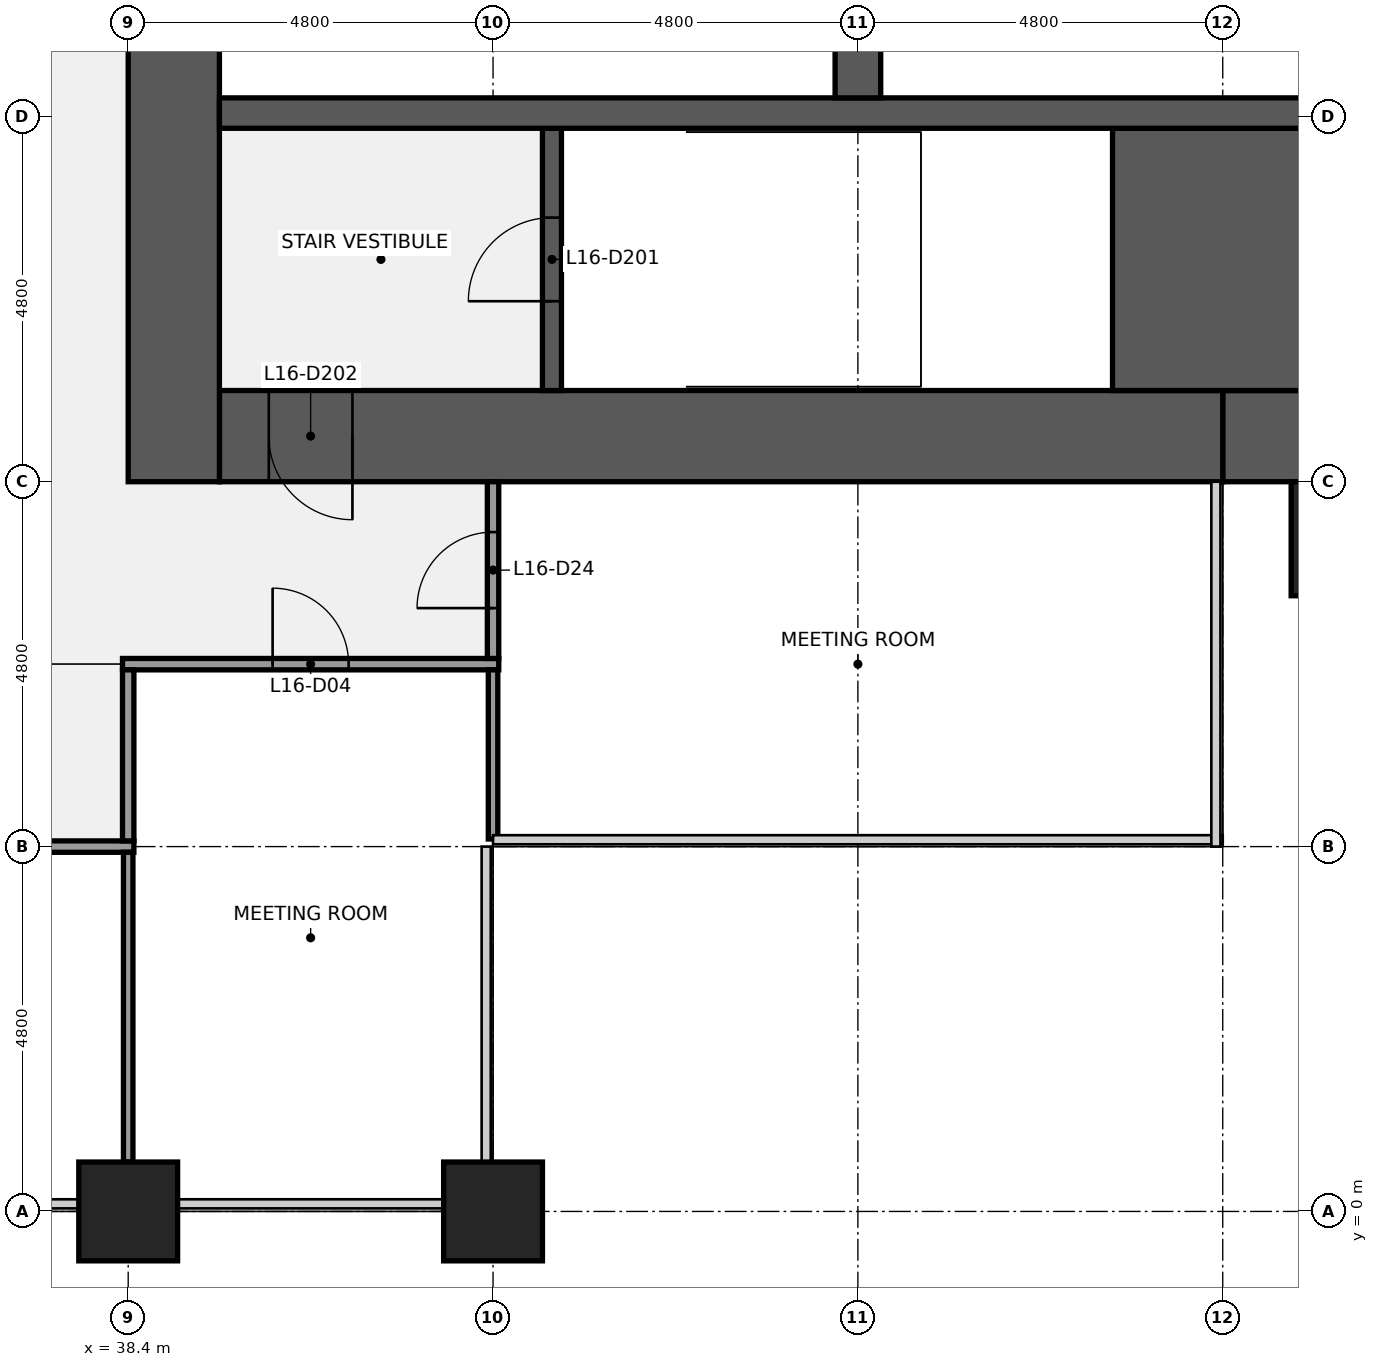
"""IFC4 building model, lengths in metres.
Left out: names, types, materials, properties, quantities, classifications, styles, units other than length and angle.
Written with IfcOpenShell. Run it as: python <this file> out.ifc"""

import sys

from ifc_helpers import new_model, si_unit, direction, frame, frame_2d, origin, origin_2d, place, context, subcontext, project, spatial, rectangle, extrude, element, fill, save


model = new_model("IFC4")
c1 = context("Model", 3, precision=1e-05, world=origin(), true_north=direction((0.0, 1.0)))
c2 = subcontext(c1, "Body", "Model", "MODEL_VIEW")
j1 = project(units=[si_unit("LENGTHUNIT", "METRE"), si_unit("PLANEANGLEUNIT", "RADIAN")], contexts=[c1])
p1 = place(None, origin())
s1 = spatial("IfcSite", under=j1, at=p1, CompositionType="ELEMENT")
p2 = place(p1, origin())
s2 = spatial("IfcBuilding", under=s1, at=p2, CompositionType="ELEMENT")
p3 = place(p2, frame((0.0, 0.0, 75.0)))
s3 = spatial("IfcBuildingStorey", under=s2, at=p3, CompositionType="ELEMENT", Elevation=75.0)
for number, where, z_axis, x_axis in (
    (1, (38.4, 0.0, 0.0), (0.0, 0.0, 1.0), (1.0, 0.0, 0.0)),
    (2, (43.2, 0.0, 0.0), (0.0, 0.0, 1.0), (1.0, 0.0, 0.0)),
):
    element("IfcColumn", number, at=place(p3, frame(where, z_axis=z_axis, x_axis=x_axis)), inside=s3, PredefinedType="COLUMN", context=c2, shape_type="SweptSolid", body=[
        extrude(rectangle(XDim=1.3, YDim=1.3, at=origin_2d()), origin(), (0.0, 0.0, 1.0), 4.0),
    ])
p4 = place(p3, frame((56.4, 10.2, 0.0), z_axis=(0.0, 0.0, 1.0), x_axis=(-1.0, 0.0, 0.0)))
e3 = element("IfcWall", 3, at=p4, inside=s3, PredefinedType="SHEAR", context=c2, shape_type="SweptSolid", body=[
    extrude(rectangle(XDim=3.6, YDim=1.2, at=frame_2d((1.8, 0.0))), origin(), (0.0, 0.0, 1.0), 3.84),
])
p5 = place(p3, frame((52.8, 10.2, 0.0), z_axis=(0.0, 0.0, 1.0), x_axis=(-1.0, 0.0, 0.0)))
e4 = element("IfcWall", 4, at=p5, inside=s3, PredefinedType="SHEAR", context=c2, shape_type="SweptSolid", body=[
    extrude(rectangle(XDim=13.2, YDim=1.2, at=frame_2d((6.6, 0.0))), origin(), (0.0, 0.0, 1.0), 3.84),
])
p6 = place(p5, frame((11.45, 0.0, 0.0)))
e5 = element("IfcOpeningElement", 5, at=p6, cuts=e4, PredefinedType="OPENING", context=c2, shape_type="SweptSolid", body=[
    extrude(rectangle(XDim=1.1, YDim=2.1, at=frame_2d((0.55, 1.05))), frame((0.0, 0.61, 0.0), z_axis=(0.0, -1.0, 0.0), x_axis=(1.0, 0.0, 0.0)), (0.0, 0.0, 1.0), 1.22),
])
p7 = place(p3, frame((39.0, 9.6, 0.0), z_axis=(0.0, 0.0, 1.0), x_axis=(0.0, 1.0, 0.0)))
e6 = element("IfcWall", 6, at=p7, inside=s3, PredefinedType="SHEAR", context=c2, shape_type="SweptSolid", body=[
    extrude(rectangle(XDim=28.8, YDim=1.2, at=frame_2d((14.4, 0.0))), origin(), (0.0, 0.0, 1.0), 3.84),
])
p8 = place(p7, frame((8.7, 0.0, 0.0)))
e7 = element("IfcOpeningElement", 7, at=p8, cuts=e6, PredefinedType="OPENING", context=c2, shape_type="SweptSolid", body=[
    extrude(rectangle(XDim=1.8, YDim=2.1, at=frame_2d((0.9, 1.05))), frame((0.0, 0.61, 0.0), z_axis=(0.0, -1.0, 0.0), x_axis=(1.0, 0.0, 0.0)), (0.0, 0.0, 1.0), 1.22),
])
p9 = place(p7, frame((18.3, 0.0, 0.0)))
e8 = element("IfcOpeningElement", 8, at=p9, cuts=e6, PredefinedType="OPENING", context=c2, shape_type="SweptSolid", body=[
    extrude(rectangle(XDim=1.8, YDim=2.1, at=frame_2d((0.9, 1.05))), frame((0.0, 0.61, 0.0), z_axis=(0.0, -1.0, 0.0), x_axis=(1.0, 0.0, 0.0)), (0.0, 0.0, 1.0), 1.22),
])
p10 = place(p3, frame((51.35, 12.525, 0.0), z_axis=(0.0, 0.0, 1.0), x_axis=(1.0, 0.0, 0.0)))
e9 = element("IfcWall", 9, at=p10, inside=s3, PredefinedType="SHEAR", context=c2, shape_type="SweptSolid", body=[
    extrude(rectangle(XDim=5.05, YDim=3.45, at=frame_2d((2.525, 0.0))), origin(), (0.0, 0.0, 1.0), 3.84),
])
p11 = place(p3, frame((43.975, 10.8, 0.0), z_axis=(0.0, 0.0, 1.0), x_axis=(0.0, 1.0, 0.0)))
e10 = element("IfcWall", 10, at=p11, inside=s3, PredefinedType="SHEAR", context=c2, shape_type="SweptSolid", body=[
    extrude(rectangle(XDim=3.45, YDim=0.25, at=frame_2d((1.725, 0.0))), origin(), (0.0, 0.0, 1.0), 3.84),
])
p12 = place(p11, frame((1.175, 0.0, 0.0)))
e11 = element("IfcOpeningElement", 11, at=p12, cuts=e10, PredefinedType="OPENING", context=c2, shape_type="SweptSolid", body=[
    extrude(rectangle(XDim=1.1, YDim=2.1, at=frame_2d((0.55, 1.05))), frame((0.0, 0.135, 0.0), z_axis=(0.0, -1.0, 0.0), x_axis=(1.0, 0.0, 0.0)), (0.0, 0.0, 1.0), 0.27),
])
p13 = place(p3, frame((39.6, 14.45, 0.0), z_axis=(0.0, 0.0, 1.0), x_axis=(1.0, 0.0, 0.0)))
e12 = element("IfcWall", 12, at=p13, inside=s3, PredefinedType="SHEAR", context=c2, shape_type="SweptSolid", body=[
    extrude(rectangle(XDim=16.8, YDim=0.4, at=frame_2d((8.4, 0.0))), origin(), (0.0, 0.0, 1.0), 3.84),
])
p14 = place(p3, frame((48.0, 14.65, 0.0), z_axis=(0.0, 0.0, 1.0), x_axis=(0.0, 1.0, 0.0)))
e13 = element("IfcWall", 13, at=p14, inside=s3, PredefinedType="SHEAR", context=c2, shape_type="SweptSolid", body=[
    extrude(rectangle(XDim=2.6, YDim=0.6, at=frame_2d((1.3, 0.0))), origin(), (0.0, 0.0, 1.0), 3.84),
])
p15 = place(p3, frame((19.125, 4.8, 0.0), z_axis=(0.0, 0.0, 1.0), x_axis=(1.0, 0.0, 0.0)))
e14 = element("IfcWall", 14, at=p15, inside=s3, PredefinedType="PARTITIONING", context=c2, shape_type="SweptSolid", body=[
    extrude(rectangle(XDim=19.35, YDim=0.15, at=frame_2d((9.675, 0.0))), origin(), (0.0, 0.0, 1.0), 2.87),
])
p16 = place(p15, frame((4.375, 0.0, 0.0)))
e15 = element("IfcOpeningElement", 15, at=p16, cuts=e14, PredefinedType="OPENING", context=c2, shape_type="SweptSolid", body=[
    extrude(rectangle(XDim=1.0, YDim=2.1, at=frame_2d((0.5, 1.05))), frame((0.0, 0.085, 0.0), z_axis=(0.0, -1.0, 0.0), x_axis=(1.0, 0.0, 0.0)), (0.0, 0.0, 1.0), 0.17),
])
p17 = place(p15, frame((13.975, 0.0, 0.0)))
e16 = element("IfcOpeningElement", 16, at=p17, cuts=e14, PredefinedType="OPENING", context=c2, shape_type="SweptSolid", body=[
    extrude(rectangle(XDim=1.0, YDim=2.1, at=frame_2d((0.5, 1.05))), frame((0.0, 0.085, 0.0), z_axis=(0.0, -1.0, 0.0), x_axis=(1.0, 0.0, 0.0)), (0.0, 0.0, 1.0), 0.17),
])
p18 = place(p3, frame((38.325, 7.2, 0.0), z_axis=(0.0, 0.0, 1.0), x_axis=(1.0, 0.0, 0.0)))
e17 = element("IfcWall", 17, at=p18, inside=s3, PredefinedType="PARTITIONING", context=c2, shape_type="SweptSolid", body=[
    extrude(rectangle(XDim=4.95, YDim=0.15, at=frame_2d((2.475, 0.0))), origin(), (0.0, 0.0, 1.0), 2.87),
])
p19 = place(p18, frame((1.975, 0.0, 0.0)))
e18 = element("IfcOpeningElement", 18, at=p19, cuts=e17, PredefinedType="OPENING", context=c2, shape_type="SweptSolid", body=[
    extrude(rectangle(XDim=1.0, YDim=2.1, at=frame_2d((0.5, 1.05))), frame((0.0, 0.085, 0.0), z_axis=(0.0, -1.0, 0.0), x_axis=(1.0, 0.0, 0.0)), (0.0, 0.0, 1.0), 0.17),
])
p20 = place(p3, frame((38.4, 0.65, 0.0), z_axis=(0.0, 0.0, 1.0), x_axis=(0.0, 1.0, 0.0)))
e19 = element("IfcWall", 19, at=p20, inside=s3, PredefinedType="PARTITIONING", context=c2, shape_type="SweptSolid", body=[
    extrude(rectangle(XDim=4.075, YDim=0.125, at=frame_2d((2.038, 0.0))), origin(), (0.0, 0.0, 1.0), 2.87),
])
p21 = place(p3, frame((38.4, 4.875, 0.0), z_axis=(0.0, 0.0, 1.0), x_axis=(0.0, 1.0, 0.0)))
e20 = element("IfcWall", 20, at=p21, inside=s3, PredefinedType="PARTITIONING", context=c2, shape_type="SweptSolid", body=[
    extrude(rectangle(XDim=2.25, YDim=0.15, at=frame_2d((1.125, 0.0))), origin(), (0.0, 0.0, 1.0), 2.87),
])
p22 = place(p3, frame((43.2, 4.9, 0.0), z_axis=(0.0, 0.0, 1.0), x_axis=(0.0, 1.0, 0.0)))
e21 = element("IfcWall", 21, at=p22, inside=s3, PredefinedType="PARTITIONING", context=c2, shape_type="SweptSolid", body=[
    extrude(rectangle(XDim=2.225, YDim=0.125, at=frame_2d((1.113, 0.0))), origin(), (0.0, 0.0, 1.0), 2.87),
])
p23 = place(p3, frame((43.2, 7.275, 0.0), z_axis=(0.0, 0.0, 1.0), x_axis=(0.0, 1.0, 0.0)))
e22 = element("IfcWall", 22, at=p23, inside=s3, PredefinedType="PARTITIONING", context=c2, shape_type="SweptSolid", body=[
    extrude(rectangle(XDim=2.325, YDim=0.15, at=frame_2d((1.163, 0.0))), origin(), (0.0, 0.0, 1.0), 2.87),
])
p24 = place(p23, frame((0.663, 0.0, 0.0)))
e23 = element("IfcOpeningElement", 23, at=p24, cuts=e22, PredefinedType="OPENING", context=c2, shape_type="SweptSolid", body=[
    extrude(rectangle(XDim=1.0, YDim=2.1, at=frame_2d((0.5, 1.05))), frame((0.0, 0.085, 0.0), z_axis=(0.0, -1.0, 0.0), x_axis=(1.0, 0.0, 0.0)), (0.0, 0.0, 1.0), 0.17),
])
p25 = place(p3, frame((55.2, 8.85, 0.0), z_axis=(0.0, 0.0, 1.0), x_axis=(1.0, 0.0, 0.0)))
e24 = element("IfcColumn", 24, at=p25, inside=s3, PredefinedType="PILASTER", context=c2, shape_type="SweptSolid", body=[
    extrude(rectangle(XDim=3.0, YDim=1.5, at=origin_2d()), origin(), (0.0, 0.0, 1.0), 4.0),
])
for number, where, z_axis, x_axis in (
    (25, (38.4, -1.075, 0.0), (0.0, 0.0, 1.0), (1.0, 0.0, 0.0)),
    (26, (43.2, -1.075, 0.0), (0.0, 0.0, 1.0), (1.0, 0.0, 0.0)),
):
    element("IfcColumn", number, at=place(p3, frame(where, z_axis=z_axis, x_axis=x_axis)), inside=s3, PredefinedType="PILASTER", context=c2, shape_type="SweptSolid", body=[
        extrude(rectangle(XDim=4.2, YDim=0.85, at=origin_2d()), origin(), (0.0, 0.0, 1.0), 4.0),
    ])
p26 = place(p12, origin())
e27 = element("IfcDoor", 27, at=p26, inside=s3, OperationType="SINGLE_SWING_LEFT", PredefinedType="DOOR", context=c2, shape_type="SweptSolid", body=[
    extrude(rectangle(XDim=1.1, YDim=2.1, at=frame_2d((0.55, 1.05))), frame((0.0, 0.025, 0.0), z_axis=(0.0, -1.0, 0.0), x_axis=(1.0, 0.0, 0.0)), (0.0, 0.0, 1.0), 0.05),
])
fill(e11, e27)
p27 = place(p6, origin())
e28 = element("IfcDoor", 28, at=p27, inside=s3, OperationType="SINGLE_SWING_LEFT", PredefinedType="DOOR", context=c2, shape_type="SweptSolid", body=[
    extrude(rectangle(XDim=1.1, YDim=2.1, at=frame_2d((0.55, 1.05))), frame((0.0, 0.025, 0.0), z_axis=(0.0, -1.0, 0.0), x_axis=(1.0, 0.0, 0.0)), (0.0, 0.0, 1.0), 0.05),
])
fill(e5, e28)
p28 = place(p19, origin())
e29 = element("IfcDoor", 29, at=p28, inside=s3, OperationType="SINGLE_SWING_LEFT", PredefinedType="DOOR", context=c2, shape_type="SweptSolid", body=[
    extrude(rectangle(XDim=1.0, YDim=2.1, at=frame_2d((0.5, 1.05))), frame((0.0, 0.025, 0.0), z_axis=(0.0, -1.0, 0.0), x_axis=(1.0, 0.0, 0.0)), (0.0, 0.0, 1.0), 0.05),
])
fill(e18, e29)
p29 = place(p24, origin())
e30 = element("IfcDoor", 30, at=p29, inside=s3, OperationType="SINGLE_SWING_LEFT", PredefinedType="DOOR", context=c2, shape_type="SweptSolid", body=[
    extrude(rectangle(XDim=1.0, YDim=2.1, at=frame_2d((0.5, 1.05))), frame((0.0, 0.025, 0.0), z_axis=(0.0, -1.0, 0.0), x_axis=(1.0, 0.0, 0.0)), (0.0, 0.0, 1.0), 0.05),
])
fill(e23, e30)
save(model, sys.argv[1])
